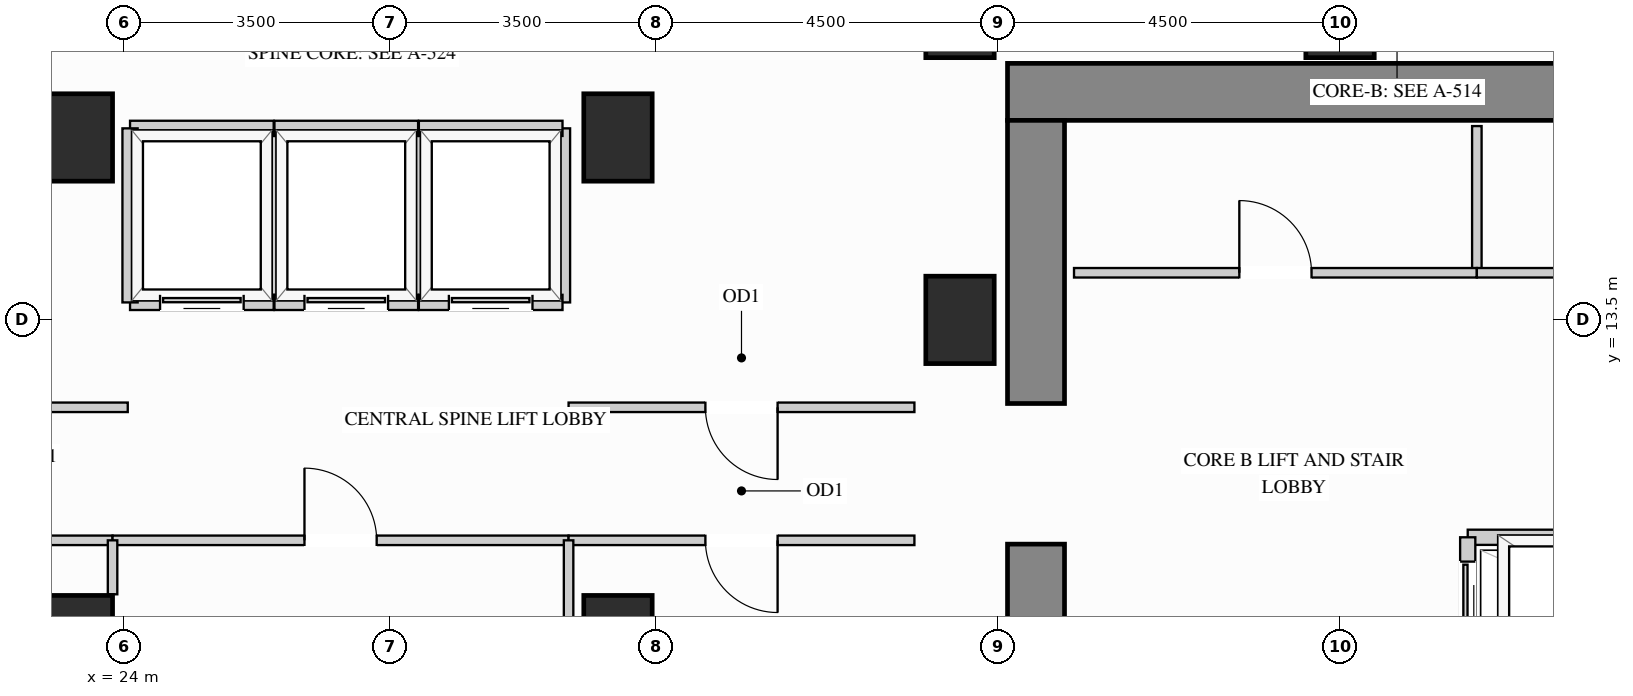
"""IFC4 building model, lengths in metres.
Left out: names, types, materials, properties, quantities, classifications, styles, units other than length and angle.
Written with IfcOpenShell. Run it as: python <this file> out.ifc"""

import sys

from ifc_helpers import new_model, si_unit, direction, frame, frame_2d, origin, origin_2d, place, context, subcontext, project, spatial, rectangle, extrude, source, transform, mapped, element, fill, save


model = new_model("IFC4")
c1 = context("Model", 3, precision=1e-05, world=origin(), true_north=direction((0.0, 1.0)))
c2 = subcontext(c1, "Body", "Model", "MODEL_VIEW")
j1 = project(units=[si_unit("LENGTHUNIT", "METRE"), si_unit("PLANEANGLEUNIT", "RADIAN")], contexts=[c1])
p1 = place(None, origin())
s1 = spatial("IfcSite", under=j1, at=p1, CompositionType="ELEMENT")
p2 = place(p1, origin())
s2 = spatial("IfcBuilding", under=s1, at=p2, CompositionType="ELEMENT")
p3 = place(p2, frame((0.0, 0.0, 109.8)))
s3 = spatial("IfcBuildingStorey", under=s2, at=p3, CompositionType="ELEMENT", Elevation=109.8)
m1 = source(origin(), c2, "Body", "SweptSolid", [
    extrude(rectangle(XDim=0.9, YDim=0.9, at=origin_2d()), origin(), (0.0, 0.0, 1.0), 3.38),
])
for number, where, z_axis, x_axis in (
    (1, (35.0, 17.4, 0.0), (0.0, 0.0, 1.0), (1.0, 0.0, 0.0)),
    (2, (40.0, 17.4, 0.0), (0.0, 0.0, 1.0), (1.0, 0.0, 0.0)),
):
    element("IfcColumn", number, at=place(p3, frame(where, z_axis=z_axis, x_axis=x_axis)), inside=s3, PredefinedType="COLUMN", context=c2, shape_type="MappedRepresentation", body=[
        mapped(m1, transform((0.0, 0.0, 0.0), x_axis=(1.0, 0.0, 0.0), y_axis=(0.0, 1.0, 0.0), z_axis=(0.0, 0.0, 1.0))),
    ])
m2 = source(origin(), c2, "Body", "SweptSolid", [
    extrude(rectangle(XDim=0.9, YDim=1.15, at=origin_2d()), origin(), (0.0, 0.0, 1.0), 3.38),
])
for number, where, z_axis, x_axis in (
    (3, (35.0, 13.5, 0.0), (0.0, 0.0, 1.0), (1.0, 0.0, 0.0)),
    (4, (23.4, 15.9, 0.0), (0.0, 0.0, 1.0), (1.0, 0.0, 0.0)),
    (5, (23.4, 9.3, 0.0), (0.0, 0.0, 1.0), (1.0, 0.0, 0.0)),
    (6, (30.5, 15.9, 0.0), (0.0, 0.0, 1.0), (1.0, 0.0, 0.0)),
    (7, (30.5, 9.3, 0.0), (0.0, 0.0, 1.0), (1.0, 0.0, 0.0)),
):
    element("IfcColumn", number, at=place(p3, frame(where, z_axis=z_axis, x_axis=x_axis)), inside=s3, PredefinedType="COLUMN", context=c2, shape_type="MappedRepresentation", body=[
        mapped(m2, transform((0.0, 0.0, 0.0), x_axis=(1.0, 0.0, 0.0), y_axis=(0.0, 1.0, 0.0), z_axis=(0.0, 0.0, 1.0))),
    ])
m3 = source(origin(), c2, "Body", "SweptSolid", [
    extrude(rectangle(XDim=10.25, YDim=0.75, at=frame_2d((5.125, 0.0))), origin(), (0.0, 0.0, 1.0), 3.38),
])
p4 = place(p3, frame((35.625, 16.5, 0.0), z_axis=(0.0, 0.0, 1.0), x_axis=(1.0, 0.0, 0.0)))
e8 = element("IfcWall", 8, at=p4, inside=s3, PredefinedType="SHEAR", context=c2, shape_type="MappedRepresentation", body=[
    mapped(m3, transform((0.0, 0.0, 0.0), x_axis=(1.0, 0.0, 0.0), y_axis=(0.0, 1.0, 0.0), z_axis=(0.0, 0.0, 1.0))),
])
m4 = source(origin(), c2, "Body", "SweptSolid", [
    extrude(rectangle(XDim=5.675, YDim=0.75, at=frame_2d((2.837, 0.0))), origin(), (0.0, 0.0, 1.0), 3.38),
])
p5 = place(p3, frame((36.0, 4.875, 0.0), z_axis=(0.0, 0.0, 1.0), x_axis=(0.0, 1.0, 0.0)))
e9 = element("IfcWall", 9, at=p5, inside=s3, PredefinedType="SHEAR", context=c2, shape_type="MappedRepresentation", body=[
    mapped(m4, transform((0.0, 0.0, 0.0), x_axis=(1.0, 0.0, 0.0), y_axis=(0.0, 1.0, 0.0), z_axis=(0.0, 0.0, 1.0))),
])
m5 = source(origin(), c2, "Body", "SweptSolid", [
    extrude(rectangle(XDim=3.725, YDim=0.75, at=frame_2d((1.863, 0.0))), origin(), (0.0, 0.0, 1.0), 3.38),
])
p6 = place(p3, frame((36.0, 12.4, 0.0), z_axis=(0.0, 0.0, 1.0), x_axis=(0.0, 1.0, 0.0)))
e10 = element("IfcWall", 10, at=p6, inside=s3, PredefinedType="SHEAR", context=c2, shape_type="MappedRepresentation", body=[
    mapped(m5, transform((0.0, 0.0, 0.0), x_axis=(1.0, 0.0, 0.0), y_axis=(0.0, 1.0, 0.0), z_axis=(0.0, 0.0, 1.0))),
])
m6 = source(origin(), c2, "Body", "SweptSolid", [
    extrude(rectangle(XDim=1.93, YDim=0.125, at=frame_2d((0.965, 0.0))), origin(), (0.0, 0.0, 1.0), 3.365),
])
p7 = place(p3, frame((41.8, 14.12, 0.0), z_axis=(0.0, 0.0, 1.0), x_axis=(0.0, 1.0, 0.0)))
e11 = element("IfcWall", 11, at=p7, inside=s3, PredefinedType="PARTITIONING", context=c2, shape_type="MappedRepresentation", body=[
    mapped(m6, transform((0.0, 0.0, 0.0), x_axis=(1.0, 0.0, 0.0), y_axis=(0.0, 1.0, 0.0), z_axis=(0.0, 0.0, 1.0))),
])
p8 = place(p3, frame((36.5, 14.12, 0.0), z_axis=(0.0, 0.0, 1.0), x_axis=(1.0, 0.0, 0.0)))
e12 = element("IfcWall", 12, at=p8, inside=s3, PredefinedType="PARTITIONING", context=c2, shape_type="SweptSolid", body=[
    extrude(rectangle(XDim=5.3, YDim=0.125, at=frame_2d((2.65, 0.0))), origin(), (0.0, 0.0, 1.0), 3.365),
])
p9 = place(p8, frame((2.175, 0.0, 0.0)))
e13 = element("IfcOpeningElement", 13, at=p9, cuts=e12, PredefinedType="OPENING", context=c2, shape_type="SweptSolid", body=[
    extrude(rectangle(XDim=0.95, YDim=2.15, at=frame_2d((0.475, 1.075))), frame((0.0, 0.073, 0.0), z_axis=(0.0, -1.0, 0.0), x_axis=(1.0, 0.0, 0.0)), (0.0, 0.0, 1.0), 0.145),
])
p10 = place(p3, frame((41.8, 14.12, 0.0), z_axis=(0.0, 0.0, 1.0), x_axis=(1.0, 0.0, 0.0)))
e14 = element("IfcWall", 14, at=p10, inside=s3, PredefinedType="PARTITIONING", context=c2, shape_type="SweptSolid", body=[
    extrude(rectangle(XDim=3.22, YDim=0.125, at=frame_2d((1.61, 0.0))), origin(), (0.0, 0.0, 1.0), 3.365),
])
p11 = place(p10, frame((1.135, 0.0, 0.0)))
e15 = element("IfcOpeningElement", 15, at=p11, cuts=e14, PredefinedType="OPENING", context=c2, shape_type="SweptSolid", body=[
    extrude(rectangle(XDim=0.85, YDim=2.1, at=frame_2d((0.425, 1.05))), frame((0.0, 0.073, 0.0), z_axis=(0.0, -1.0, 0.0), x_axis=(1.0, 0.0, 0.0)), (0.0, 0.0, 1.0), 0.145),
])
p12 = place(p3, frame((29.85, 12.35, 0.0), z_axis=(0.0, 0.0, 1.0), x_axis=(1.0, 0.0, 0.0)))
e16 = element("IfcWall", 16, at=p12, inside=s3, PredefinedType="PARTITIONING", context=c2, shape_type="SweptSolid", body=[
    extrude(rectangle(XDim=4.55, YDim=0.125, at=frame_2d((2.275, 0.0))), origin(), (0.0, 0.0, 1.0), 3.365),
])
p13 = place(p12, frame((1.8, 0.0, 0.0)))
e17 = element("IfcOpeningElement", 17, at=p13, cuts=e16, PredefinedType="OPENING", context=c2, shape_type="SweptSolid", body=[
    extrude(rectangle(XDim=0.95, YDim=2.15, at=frame_2d((0.475, 1.075))), frame((0.0, 0.073, 0.0), z_axis=(0.0, -1.0, 0.0), x_axis=(1.0, 0.0, 0.0)), (0.0, 0.0, 1.0), 0.145),
])
p14 = place(p3, frame((19.5, 12.35, 0.0), z_axis=(0.0, 0.0, 1.0), x_axis=(1.0, 0.0, 0.0)))
e18 = element("IfcWall", 18, at=p14, inside=s3, PredefinedType="PARTITIONING", context=c2, shape_type="SweptSolid", body=[
    extrude(rectangle(XDim=4.55, YDim=0.125, at=frame_2d((2.275, 0.0))), origin(), (0.0, 0.0, 1.0), 3.365),
])
p15 = place(p14, frame((1.8, 0.0, 0.0)))
e19 = element("IfcOpeningElement", 19, at=p15, cuts=e18, PredefinedType="OPENING", context=c2, shape_type="SweptSolid", body=[
    extrude(rectangle(XDim=0.95, YDim=2.15, at=frame_2d((0.475, 1.075))), frame((0.0, 0.073, 0.0), z_axis=(0.0, -1.0, 0.0), x_axis=(1.0, 0.0, 0.0)), (0.0, 0.0, 1.0), 0.145),
])
p16 = place(p3, frame((19.5, 10.6, 0.0), z_axis=(0.0, 0.0, 1.0), x_axis=(1.0, 0.0, 0.0)))
e20 = element("IfcWall", 20, at=p16, inside=s3, PredefinedType="PARTITIONING", context=c2, shape_type="SweptSolid", body=[
    extrude(rectangle(XDim=4.35, YDim=0.125, at=frame_2d((2.175, 0.0))), origin(), (0.0, 0.0, 1.0), 3.365),
])
p17 = place(p16, frame((1.7, 0.0, 0.0)))
e21 = element("IfcOpeningElement", 21, at=p17, cuts=e20, PredefinedType="OPENING", context=c2, shape_type="SweptSolid", body=[
    extrude(rectangle(XDim=0.95, YDim=2.15, at=frame_2d((0.475, 1.075))), frame((0.0, 0.073, 0.0), z_axis=(0.0, -1.0, 0.0), x_axis=(1.0, 0.0, 0.0)), (0.0, 0.0, 1.0), 0.145),
])
p18 = place(p3, frame((23.85, 10.6, 0.0), z_axis=(0.0, 0.0, 1.0), x_axis=(1.0, 0.0, 0.0)))
e22 = element("IfcWall", 22, at=p18, inside=s3, PredefinedType="PARTITIONING", context=c2, shape_type="SweptSolid", body=[
    extrude(rectangle(XDim=6.0, YDim=0.125, at=frame_2d((3.0, 0.0))), origin(), (0.0, 0.0, 1.0), 3.365),
])
p19 = place(p18, frame((2.525, 0.0, 0.0)))
e23 = element("IfcOpeningElement", 23, at=p19, cuts=e22, PredefinedType="OPENING", context=c2, shape_type="SweptSolid", body=[
    extrude(rectangle(XDim=0.95, YDim=2.15, at=frame_2d((0.475, 1.075))), frame((0.0, 0.073, 0.0), z_axis=(0.0, -1.0, 0.0), x_axis=(1.0, 0.0, 0.0)), (0.0, 0.0, 1.0), 0.145),
])
p20 = place(p3, frame((29.85, 10.6, 0.0), z_axis=(0.0, 0.0, 1.0), x_axis=(1.0, 0.0, 0.0)))
e24 = element("IfcWall", 24, at=p20, inside=s3, PredefinedType="PARTITIONING", context=c2, shape_type="SweptSolid", body=[
    extrude(rectangle(XDim=4.55, YDim=0.125, at=frame_2d((2.275, 0.0))), origin(), (0.0, 0.0, 1.0), 3.365),
])
p21 = place(p20, frame((1.8, 0.0, 0.0)))
e25 = element("IfcOpeningElement", 25, at=p21, cuts=e24, PredefinedType="OPENING", context=c2, shape_type="SweptSolid", body=[
    extrude(rectangle(XDim=0.95, YDim=2.15, at=frame_2d((0.475, 1.075))), frame((0.0, 0.073, 0.0), z_axis=(0.0, -1.0, 0.0), x_axis=(1.0, 0.0, 0.0)), (0.0, 0.0, 1.0), 0.145),
])
m7 = source(origin(), c2, "Body", "SweptSolid", [
    extrude(rectangle(XDim=0.71, YDim=0.125, at=frame_2d((0.355, 0.0))), origin(), (0.0, 0.0, 1.0), 3.365),
])
p22 = place(p3, frame((23.85, 9.89, 0.0), z_axis=(0.0, 0.0, 1.0), x_axis=(0.0, 1.0, 0.0)))
e26 = element("IfcWall", 26, at=p22, inside=s3, PredefinedType="PARTITIONING", context=c2, shape_type="MappedRepresentation", body=[
    mapped(m7, transform((0.0, 0.0, 0.0), x_axis=(1.0, 0.0, 0.0), y_axis=(0.0, 1.0, 0.0), z_axis=(0.0, 0.0, 1.0))),
])
m8 = source(origin(), c2, "Body", "SweptSolid", [
    extrude(rectangle(XDim=1.748, YDim=0.125, at=frame_2d((0.874, 0.0))), origin(), (0.0, 0.0, 1.0), 3.365),
])
p23 = place(p3, frame((29.85, 8.852, 0.0), z_axis=(0.0, 0.0, 1.0), x_axis=(0.0, 1.0, 0.0)))
e27 = element("IfcWall", 27, at=p23, inside=s3, PredefinedType="PARTITIONING", context=c2, shape_type="MappedRepresentation", body=[
    mapped(m8, transform((0.0, 0.0, 0.0), x_axis=(1.0, 0.0, 0.0), y_axis=(0.0, 1.0, 0.0), z_axis=(0.0, 0.0, 1.0))),
])
m9 = source(origin(), c2, "Body", "SweptSolid", [
    extrude(rectangle(XDim=2.29, YDim=0.2, at=frame_2d((1.145, 0.0))), origin(), (0.0, 0.0, 1.0), 3.365),
])
p24 = place(p3, frame((25.97, 13.73, 0.0), z_axis=(0.0, 0.0, 1.0), x_axis=(0.0, 1.0, 0.0)))
e28 = element("IfcWall", 28, at=p24, inside=s3, PredefinedType="PARTITIONING", context=c2, shape_type="MappedRepresentation", body=[
    mapped(m9, transform((0.0, 0.0, 0.0), x_axis=(1.0, 0.0, 0.0), y_axis=(0.0, 1.0, 0.0), z_axis=(0.0, 0.0, 1.0))),
])
m10 = source(origin(), c2, "Body", "SweptSolid", [
    extrude(rectangle(XDim=1.89, YDim=0.2, at=frame_2d((0.945, 0.0))), origin(), (0.0, 0.0, 1.0), 2.677),
])
p25 = place(p3, frame((24.08, 16.02, 0.0), z_axis=(0.0, 0.0, 1.0), x_axis=(1.0, 0.0, 0.0)))
e29 = element("IfcWall", 29, at=p25, inside=s3, PredefinedType="PARTITIONING", context=c2, shape_type="MappedRepresentation", body=[
    mapped(m10, transform((0.0, 0.0, 0.0), x_axis=(1.0, 0.0, 0.0), y_axis=(0.0, 1.0, 0.0), z_axis=(0.0, 0.0, 1.0))),
])
p26 = place(p3, frame((24.08, 13.73, 0.0), z_axis=(0.0, 0.0, 1.0), x_axis=(1.0, 0.0, 0.0)))
e30 = element("IfcWall", 30, at=p26, inside=s3, PredefinedType="PARTITIONING", context=c2, shape_type="SweptSolid", body=[
    extrude(rectangle(XDim=1.89, YDim=0.2, at=frame_2d((0.945, 0.0))), origin(), (0.0, 0.0, 1.0), 2.446),
])
p27 = place(p26, frame((0.395, 0.0, 0.0)))
e31 = element("IfcOpeningElement", 31, at=p27, cuts=e30, PredefinedType="OPENING", context=c2, shape_type="SweptSolid", body=[
    extrude(rectangle(XDim=1.1, YDim=2.2, at=frame_2d((0.55, 1.1))), frame((0.0, 0.11, 0.0), z_axis=(0.0, -1.0, 0.0), x_axis=(1.0, 0.0, 0.0)), (0.0, 0.0, 1.0), 0.22),
])
for number, where, z_axis, x_axis in (
    (32, (24.08, 13.73, 0.0), (0.0, 0.0, 1.0), (0.0, 1.0, 0.0)),
    (33, (27.87, 13.73, 0.0), (0.0, 0.0, 1.0), (0.0, 1.0, 0.0)),
):
    element("IfcWall", number, at=place(p3, frame(where, z_axis=z_axis, x_axis=x_axis)), inside=s3, PredefinedType="PARTITIONING", context=c2, shape_type="MappedRepresentation", body=[
        mapped(m9, transform((0.0, 0.0, 0.0), x_axis=(1.0, 0.0, 0.0), y_axis=(0.0, 1.0, 0.0), z_axis=(0.0, 0.0, 1.0))),
    ])
m11 = source(origin(), c2, "Body", "SweptSolid", [
    extrude(rectangle(XDim=1.89, YDim=0.2, at=frame_2d((0.945, 0.0))), origin(), (0.0, 0.0, 1.0), 2.677),
])
p28 = place(p3, frame((25.98, 16.02, 0.0), z_axis=(0.0, 0.0, 1.0), x_axis=(1.0, 0.0, 0.0)))
e34 = element("IfcWall", 34, at=p28, inside=s3, PredefinedType="PARTITIONING", context=c2, shape_type="MappedRepresentation", body=[
    mapped(m11, transform((0.0, 0.0, 0.0), x_axis=(1.0, 0.0, 0.0), y_axis=(0.0, 1.0, 0.0), z_axis=(0.0, 0.0, 1.0))),
])
p29 = place(p3, frame((25.98, 13.73, 0.0), z_axis=(0.0, 0.0, 1.0), x_axis=(1.0, 0.0, 0.0)))
e35 = element("IfcWall", 35, at=p29, inside=s3, PredefinedType="PARTITIONING", context=c2, shape_type="SweptSolid", body=[
    extrude(rectangle(XDim=1.89, YDim=0.2, at=frame_2d((0.945, 0.0))), origin(), (0.0, 0.0, 1.0), 2.446),
])
p30 = place(p29, frame((0.395, 0.0, 0.0)))
e36 = element("IfcOpeningElement", 36, at=p30, cuts=e35, PredefinedType="OPENING", context=c2, shape_type="SweptSolid", body=[
    extrude(rectangle(XDim=1.1, YDim=2.2, at=frame_2d((0.55, 1.1))), frame((0.0, 0.11, 0.0), z_axis=(0.0, -1.0, 0.0), x_axis=(1.0, 0.0, 0.0)), (0.0, 0.0, 1.0), 0.22),
])
p31 = place(p3, frame((29.77, 13.73, 0.0), z_axis=(0.0, 0.0, 1.0), x_axis=(0.0, 1.0, 0.0)))
e37 = element("IfcWall", 37, at=p31, inside=s3, PredefinedType="PARTITIONING", context=c2, shape_type="MappedRepresentation", body=[
    mapped(m9, transform((0.0, 0.0, 0.0), x_axis=(1.0, 0.0, 0.0), y_axis=(0.0, 1.0, 0.0), z_axis=(0.0, 0.0, 1.0))),
])
p32 = place(p3, frame((27.88, 16.02, 0.0), z_axis=(0.0, 0.0, 1.0), x_axis=(1.0, 0.0, 0.0)))
e38 = element("IfcWall", 38, at=p32, inside=s3, PredefinedType="PARTITIONING", context=c2, shape_type="MappedRepresentation", body=[
    mapped(m11, transform((0.0, 0.0, 0.0), x_axis=(1.0, 0.0, 0.0), y_axis=(0.0, 1.0, 0.0), z_axis=(0.0, 0.0, 1.0))),
])
p33 = place(p3, frame((27.88, 13.73, 0.0), z_axis=(0.0, 0.0, 1.0), x_axis=(1.0, 0.0, 0.0)))
e39 = element("IfcWall", 39, at=p33, inside=s3, PredefinedType="PARTITIONING", context=c2, shape_type="SweptSolid", body=[
    extrude(rectangle(XDim=1.89, YDim=0.2, at=frame_2d((0.945, 0.0))), origin(), (0.0, 0.0, 1.0), 2.446),
])
p34 = place(p33, frame((0.395, 0.0, 0.0)))
e40 = element("IfcOpeningElement", 40, at=p34, cuts=e39, PredefinedType="OPENING", context=c2, shape_type="SweptSolid", body=[
    extrude(rectangle(XDim=1.1, YDim=2.2, at=frame_2d((0.55, 1.1))), frame((0.0, 0.11, 0.0), z_axis=(0.0, -1.0, 0.0), x_axis=(1.0, 0.0, 0.0)), (0.0, 0.0, 1.0), 0.22),
])
m12 = source(origin(), c2, "Body", "SweptSolid", [
    extrude(rectangle(XDim=3.49, YDim=0.2, at=frame_2d((1.745, 0.0))), origin(), (0.0, 0.0, 1.0), 3.365),
])
p35 = place(p3, frame((41.68, 10.64, 0.0), z_axis=(0.0, 0.0, 1.0), x_axis=(1.0, 0.0, 0.0)))
e41 = element("IfcWall", 41, at=p35, inside=s3, PredefinedType="PARTITIONING", context=c2, shape_type="MappedRepresentation", body=[
    mapped(m12, transform((0.0, 0.0, 0.0), x_axis=(1.0, 0.0, 0.0), y_axis=(0.0, 1.0, 0.0), z_axis=(0.0, 0.0, 1.0))),
])
p36 = place(p3, frame((41.68, 8.9, 0.0), z_axis=(0.0, 0.0, 1.0), x_axis=(0.0, 1.0, 0.0)))
e42 = element("IfcWall", 42, at=p36, inside=s3, PredefinedType="PARTITIONING", context=c2, shape_type="SweptSolid", body=[
    extrude(rectangle(XDim=1.74, YDim=0.2, at=frame_2d((0.87, 0.0))), origin(), (0.0, 0.0, 1.0), 3.365),
])
p37 = place(p36, frame((0.32, 0.0, 0.0)))
e43 = element("IfcOpeningElement", 43, at=p37, cuts=e42, PredefinedType="OPENING", context=c2, shape_type="SweptSolid", body=[
    extrude(rectangle(XDim=1.1, YDim=2.2, at=frame_2d((0.55, 1.1))), frame((0.0, 0.11, 0.0), z_axis=(0.0, -1.0, 0.0), x_axis=(1.0, 0.0, 0.0)), (0.0, 0.0, 1.0), 0.22),
])
m13 = source(origin(), c2, "Body", "SweptSolid", [
    extrude(rectangle(XDim=1.1, YDim=2.2, at=frame_2d((0.55, 1.1))), frame((0.0, 0.025, 0.0), z_axis=(0.0, -1.0, 0.0), x_axis=(1.0, 0.0, 0.0)), (0.0, 0.0, 1.0), 0.05),
])
p38 = place(p27, origin())
e44 = element("IfcDoor", 44, at=p38, inside=s3, OperationType="SLIDING_TO_LEFT", PredefinedType="DOOR", context=c2, shape_type="MappedRepresentation", body=[
    mapped(m13, transform((0.0, 0.0, 0.0), x_axis=(1.0, 0.0, 0.0), y_axis=(0.0, 1.0, 0.0), z_axis=(0.0, 0.0, 1.0))),
])
fill(e31, e44)
p39 = place(p30, origin())
e45 = element("IfcDoor", 45, at=p39, inside=s3, OperationType="SLIDING_TO_LEFT", PredefinedType="DOOR", context=c2, shape_type="MappedRepresentation", body=[
    mapped(m13, transform((0.0, 0.0, 0.0), x_axis=(1.0, 0.0, 0.0), y_axis=(0.0, 1.0, 0.0), z_axis=(0.0, 0.0, 1.0))),
])
fill(e36, e45)
p40 = place(p34, origin())
e46 = element("IfcDoor", 46, at=p40, inside=s3, OperationType="SLIDING_TO_LEFT", PredefinedType="DOOR", context=c2, shape_type="MappedRepresentation", body=[
    mapped(m13, transform((0.0, 0.0, 0.0), x_axis=(1.0, 0.0, 0.0), y_axis=(0.0, 1.0, 0.0), z_axis=(0.0, 0.0, 1.0))),
])
fill(e40, e46)
p41 = place(p37, origin())
e47 = element("IfcDoor", 47, at=p41, inside=s3, OperationType="SLIDING_TO_LEFT", PredefinedType="DOOR", context=c2, shape_type="MappedRepresentation", body=[
    mapped(m13, transform((0.0, 0.0, 0.0), x_axis=(1.0, 0.0, 0.0), y_axis=(0.0, 1.0, 0.0), z_axis=(0.0, 0.0, 1.0))),
])
fill(e43, e47)
m14 = source(origin(), c2, "Body", "SweptSolid", [
    extrude(rectangle(XDim=0.95, YDim=2.15, at=frame_2d((0.475, 1.075))), frame((0.0, 0.025, 0.0), z_axis=(0.0, -1.0, 0.0), x_axis=(1.0, 0.0, 0.0)), (0.0, 0.0, 1.0), 0.05),
])
p42 = place(p9, origin())
e48 = element("IfcDoor", 48, at=p42, inside=s3, OperationType="SINGLE_SWING_LEFT", PredefinedType="DOOR", context=c2, shape_type="MappedRepresentation", body=[
    mapped(m14, transform((0.0, 0.0, 0.0), x_axis=(1.0, 0.0, 0.0), y_axis=(0.0, 1.0, 0.0), z_axis=(0.0, 0.0, 1.0))),
])
fill(e13, e48)
p43 = place(p13, origin())
e49 = element("IfcDoor", 49, at=p43, inside=s3, OperationType="SINGLE_SWING_RIGHT", PredefinedType="DOOR", context=c2, shape_type="MappedRepresentation", body=[
    mapped(m14, transform((0.0, 0.0, 0.0), x_axis=(1.0, 0.0, 0.0), y_axis=(0.0, 1.0, 0.0), z_axis=(0.0, 0.0, 1.0))),
])
fill(e17, e49)
p44 = place(p19, origin())
e50 = element("IfcDoor", 50, at=p44, inside=s3, OperationType="SINGLE_SWING_LEFT", PredefinedType="DOOR", context=c2, shape_type="MappedRepresentation", body=[
    mapped(m14, transform((0.0, 0.0, 0.0), x_axis=(1.0, 0.0, 0.0), y_axis=(0.0, 1.0, 0.0), z_axis=(0.0, 0.0, 1.0))),
])
fill(e23, e50)
p45 = place(p21, origin())
e51 = element("IfcDoor", 51, at=p45, inside=s3, OperationType="SINGLE_SWING_RIGHT", PredefinedType="DOOR", context=c2, shape_type="MappedRepresentation", body=[
    mapped(m14, transform((0.0, 0.0, 0.0), x_axis=(1.0, 0.0, 0.0), y_axis=(0.0, 1.0, 0.0), z_axis=(0.0, 0.0, 1.0))),
])
fill(e25, e51)
save(model, sys.argv[1])
